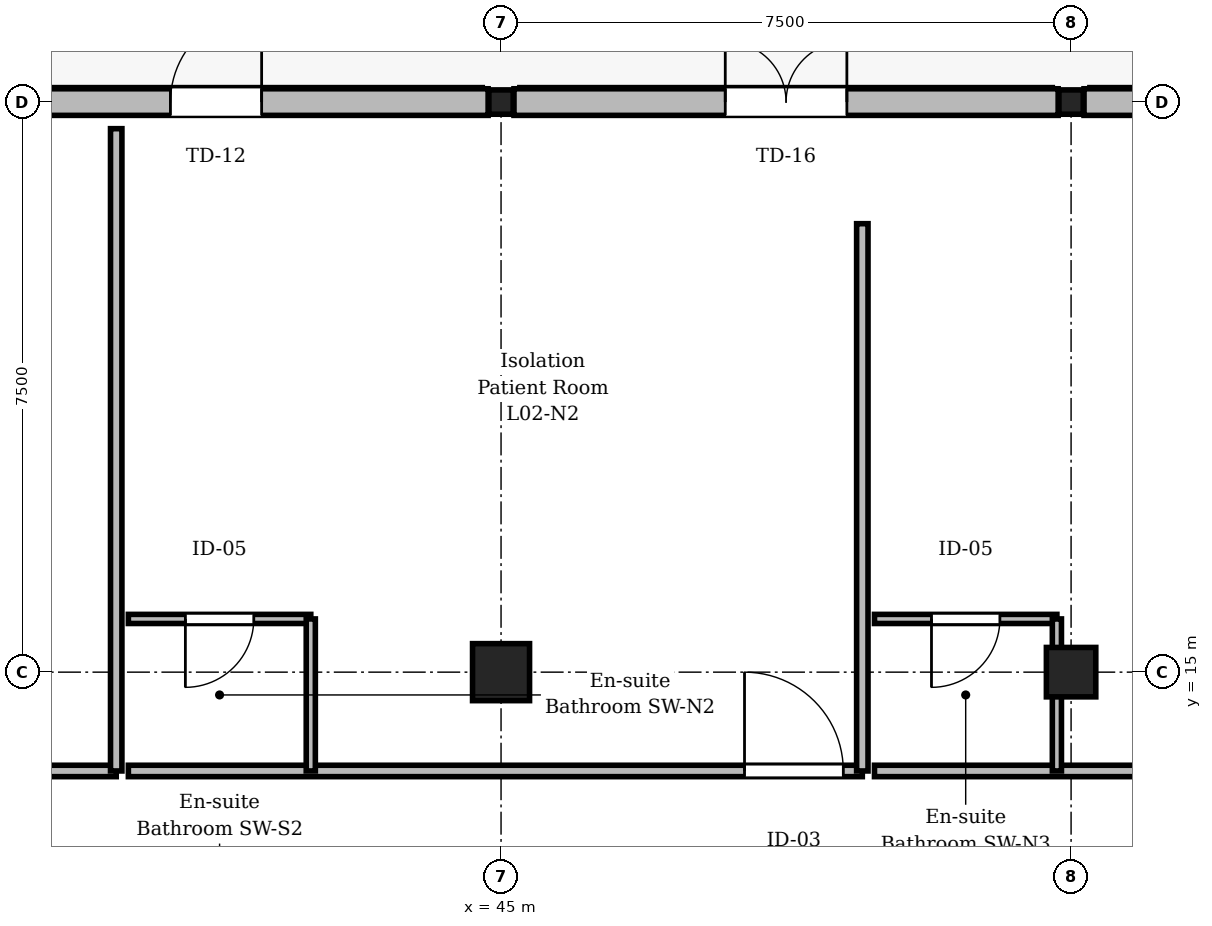
"""IFC4 building model, lengths in metres.
Left out: names, types, materials, properties, quantities, classifications, styles, units other than length and angle.
Written with IfcOpenShell. Run it as: python <this file> out.ifc"""

import sys

from ifc_helpers import new_model, si_unit, direction, frame, frame_2d, origin, origin_2d, place, context, subcontext, project, spatial, rectangle, extrude, element, fill, save


model = new_model("IFC4")
c1 = context("Model", 3, precision=1e-05, world=origin(), true_north=direction((0.0, 1.0)))
c2 = subcontext(c1, "Body", "Model", "MODEL_VIEW")
j1 = project(units=[si_unit("LENGTHUNIT", "METRE"), si_unit("PLANEANGLEUNIT", "RADIAN")], contexts=[c1])
p1 = place(None, origin())
s1 = spatial("IfcSite", under=j1, at=p1, CompositionType="ELEMENT")
p2 = place(p1, origin())
s2 = spatial("IfcBuilding", under=s1, at=p2, CompositionType="ELEMENT")
p3 = place(p2, frame((0.0, 0.0, 9.3)))
s3 = spatial("IfcBuildingStorey", under=s2, at=p3, CompositionType="ELEMENT", Elevation=9.3)
p4 = place(p3, frame((45.0, 15.0, 0.0), z_axis=(0.0, 0.0, 1.0), x_axis=(1.0, 0.0, 0.0)))
e1 = element("IfcColumn", 1, at=p4, inside=s3, PredefinedType="COLUMN", context=c2, shape_type="SweptSolid", body=[
    extrude(rectangle(XDim=0.75, YDim=0.75, at=origin_2d()), origin(), (0.0, 0.0, 1.0), 4.8),
])
p5 = place(p3, frame((45.0, 22.5, 0.0), z_axis=(0.0, 0.0, 1.0), x_axis=(1.0, 0.0, 0.0)))
e2 = element("IfcColumn", 2, at=p5, inside=s3, PredefinedType="COLUMN", context=c2, shape_type="SweptSolid", body=[
    extrude(rectangle(XDim=0.32, YDim=0.32, at=origin_2d()), origin(), (0.0, 0.0, 1.0), 4.8),
])
p6 = place(p3, frame((52.5, 15.0, 0.0), z_axis=(0.0, 0.0, 1.0), x_axis=(1.0, 0.0, 0.0)))
e3 = element("IfcColumn", 3, at=p6, inside=s3, PredefinedType="COLUMN", context=c2, shape_type="SweptSolid", body=[
    extrude(rectangle(XDim=0.65, YDim=0.65, at=origin_2d()), origin(), (0.0, 0.0, 1.0), 4.8),
])
p7 = place(p3, frame((52.5, 22.5, 0.0), z_axis=(0.0, 0.0, 1.0), x_axis=(1.0, 0.0, 0.0)))
e4 = element("IfcColumn", 4, at=p7, inside=s3, PredefinedType="COLUMN", context=c2, shape_type="SweptSolid", body=[
    extrude(rectangle(XDim=0.32, YDim=0.32, at=origin_2d()), origin(), (0.0, 0.0, 1.0), 4.8),
])
p8 = place(p3, frame((37.67, 22.5, 0.0), z_axis=(0.0, 0.0, 1.0), x_axis=(1.0, 0.0, 0.0)))
e5 = element("IfcWall", 5, at=p8, inside=s3, PredefinedType="STANDARD", context=c2, shape_type="SweptSolid", body=[
    extrude(rectangle(XDim=7.16, YDim=0.35, at=frame_2d((3.58, 0.0))), origin(), (0.0, 0.0, 1.0), 3.95),
])
p9 = place(p8, frame((2.98, 0.0, 0.0)))
e6 = element("IfcOpeningElement", 6, at=p9, cuts=e5, PredefinedType="OPENING", context=c2, shape_type="SweptSolid", body=[
    extrude(rectangle(XDim=1.2, YDim=2.3, at=frame_2d((0.6, 1.15))), frame((0.0, 0.185, 0.0), z_axis=(0.0, -1.0, 0.0), x_axis=(1.0, 0.0, 0.0)), (0.0, 0.0, 1.0), 0.37),
])
p10 = place(p3, frame((45.17, 22.5, 0.0), z_axis=(0.0, 0.0, 1.0), x_axis=(1.0, 0.0, 0.0)))
e7 = element("IfcWall", 7, at=p10, inside=s3, PredefinedType="STANDARD", context=c2, shape_type="SweptSolid", body=[
    extrude(rectangle(XDim=7.16, YDim=0.35, at=frame_2d((3.58, 0.0))), origin(), (0.0, 0.0, 1.0), 3.95),
])
p11 = place(p10, frame((2.78, 0.0, 0.0)))
e8 = element("IfcOpeningElement", 8, at=p11, cuts=e7, PredefinedType="OPENING", context=c2, shape_type="SweptSolid", body=[
    extrude(rectangle(XDim=1.6, YDim=2.35, at=frame_2d((0.8, 1.175))), frame((0.0, 0.185, 0.0), z_axis=(0.0, -1.0, 0.0), x_axis=(1.0, 0.0, 0.0)), (0.0, 0.0, 1.0), 0.37),
])
p12 = place(p3, frame((52.67, 22.5, 0.0), z_axis=(0.0, 0.0, 1.0), x_axis=(1.0, 0.0, 0.0)))
e9 = element("IfcWall", 9, at=p12, inside=s3, PredefinedType="STANDARD", context=c2, shape_type="SweptSolid", body=[
    extrude(rectangle(XDim=7.02, YDim=0.35, at=frame_2d((3.51, 0.0))), origin(), (0.0, 0.0, 1.0), 3.95),
])
p13 = place(p12, frame((2.91, 0.0, 0.0)))
e10 = element("IfcOpeningElement", 10, at=p13, cuts=e9, PredefinedType="OPENING", context=c2, shape_type="SweptSolid", body=[
    extrude(rectangle(XDim=1.2, YDim=2.3, at=frame_2d((0.6, 1.15))), frame((0.0, 0.185, 0.0), z_axis=(0.0, -1.0, 0.0), x_axis=(1.0, 0.0, 0.0)), (0.0, 0.0, 1.0), 0.37),
])
p14 = place(p3, frame((30.28, 13.7, 0.0), z_axis=(0.0, 0.0, 1.0), x_axis=(1.0, 0.0, 0.0)))
e11 = element("IfcWall", 11, at=p14, inside=s3, PredefinedType="PARTITIONING", context=c2, shape_type="SweptSolid", body=[
    extrude(rectangle(XDim=9.657, YDim=0.15, at=frame_2d((4.828, 0.0))), origin(), (0.0, 0.0, 1.0), 4.535),
])
p15 = place(p14, frame((3.393, 0.0, 0.0)))
e12 = element("IfcOpeningElement", 12, at=p15, cuts=e11, PredefinedType="OPENING", context=c2, shape_type="SweptSolid", body=[
    extrude(rectangle(XDim=1.3, YDim=2.2, at=frame_2d((0.65, 1.1))), frame((0.0, 0.085, 0.0), z_axis=(0.0, -1.0, 0.0), x_axis=(1.0, 0.0, 0.0)), (0.0, 0.0, 1.0), 0.17),
])
p16 = place(p3, frame((40.097, 13.7, 0.0), z_axis=(0.0, 0.0, 1.0), x_axis=(1.0, 0.0, 0.0)))
e13 = element("IfcWall", 13, at=p16, inside=s3, PredefinedType="PARTITIONING", context=c2, shape_type="SweptSolid", body=[
    extrude(rectangle(XDim=9.657, YDim=0.15, at=frame_2d((4.828, 0.0))), origin(), (0.0, 0.0, 1.0), 4.535),
])
p17 = place(p16, frame((8.107, 0.0, 0.0)))
e14 = element("IfcOpeningElement", 14, at=p17, cuts=e13, PredefinedType="OPENING", context=c2, shape_type="SweptSolid", body=[
    extrude(rectangle(XDim=1.3, YDim=2.2, at=frame_2d((0.65, 1.1))), frame((0.0, 0.085, 0.0), z_axis=(0.0, -1.0, 0.0), x_axis=(1.0, 0.0, 0.0)), (0.0, 0.0, 1.0), 0.17),
])
p18 = place(p3, frame((42.497, 15.7, 0.0), z_axis=(0.0, 0.0, 1.0), x_axis=(-1.0, 0.0, 0.0)))
e15 = element("IfcWall", 15, at=p18, inside=s3, PredefinedType="PARTITIONING", context=c2, shape_type="SweptSolid", body=[
    extrude(rectangle(XDim=2.4, YDim=0.12, at=frame_2d((1.2, 0.0))), origin(), (0.0, 0.0, 1.0), 4.535),
])
p19 = place(p18, frame((0.75, 0.0, 0.0)))
e16 = element("IfcOpeningElement", 16, at=p19, cuts=e15, PredefinedType="OPENING", context=c2, shape_type="SweptSolid", body=[
    extrude(rectangle(XDim=0.9, YDim=2.1, at=frame_2d((0.45, 1.05))), frame((0.0, 0.07, 0.0), z_axis=(0.0, -1.0, 0.0), x_axis=(1.0, 0.0, 0.0)), (0.0, 0.0, 1.0), 0.14),
])
p20 = place(p3, frame((42.497, 13.7, 0.0), z_axis=(0.0, 0.0, 1.0), x_axis=(0.0, 1.0, 0.0)))
e17 = element("IfcWall", 17, at=p20, inside=s3, PredefinedType="PARTITIONING", context=c2, shape_type="SweptSolid", body=[
    extrude(rectangle(XDim=2.0, YDim=0.12, at=frame_2d((1.0, 0.0))), origin(), (0.0, 0.0, 1.0), 4.535),
])
p21 = place(p3, frame((49.913, 13.7, 0.0), z_axis=(0.0, 0.0, 1.0), x_axis=(1.0, 0.0, 0.0)))
e18 = element("IfcWall", 18, at=p21, inside=s3, PredefinedType="PARTITIONING", context=c2, shape_type="SweptSolid", body=[
    extrude(rectangle(XDim=9.657, YDim=0.15, at=frame_2d((4.828, 0.0))), origin(), (0.0, 0.0, 1.0), 4.535),
])
p22 = place(p21, frame((5.75, 0.0, 0.0)))
e19 = element("IfcOpeningElement", 19, at=p22, cuts=e18, PredefinedType="OPENING", context=c2, shape_type="SweptSolid", body=[
    extrude(rectangle(XDim=1.3, YDim=2.2, at=frame_2d((0.65, 1.1))), frame((0.0, 0.085, 0.0), z_axis=(0.0, -1.0, 0.0), x_axis=(1.0, 0.0, 0.0)), (0.0, 0.0, 1.0), 0.17),
])
p23 = place(p3, frame((52.313, 15.7, 0.0), z_axis=(0.0, 0.0, 1.0), x_axis=(-1.0, 0.0, 0.0)))
e20 = element("IfcWall", 20, at=p23, inside=s3, PredefinedType="PARTITIONING", context=c2, shape_type="SweptSolid", body=[
    extrude(rectangle(XDim=2.4, YDim=0.12, at=frame_2d((1.2, 0.0))), origin(), (0.0, 0.0, 1.0), 4.535),
])
p24 = place(p23, frame((0.75, 0.0, 0.0)))
e21 = element("IfcOpeningElement", 21, at=p24, cuts=e20, PredefinedType="OPENING", context=c2, shape_type="SweptSolid", body=[
    extrude(rectangle(XDim=0.9, YDim=2.1, at=frame_2d((0.45, 1.05))), frame((0.0, 0.07, 0.0), z_axis=(0.0, -1.0, 0.0), x_axis=(1.0, 0.0, 0.0)), (0.0, 0.0, 1.0), 0.14),
])
p25 = place(p3, frame((52.313, 13.7, 0.0), z_axis=(0.0, 0.0, 1.0), x_axis=(0.0, 1.0, 0.0)))
e22 = element("IfcWall", 22, at=p25, inside=s3, PredefinedType="PARTITIONING", context=c2, shape_type="SweptSolid", body=[
    extrude(rectangle(XDim=2.0, YDim=0.12, at=frame_2d((1.0, 0.0))), origin(), (0.0, 0.0, 1.0), 3.985),
])
p26 = place(p3, frame((39.937, 13.7, 0.0), z_axis=(0.0, 0.0, 1.0), x_axis=(0.0, 1.0, 0.0)))
e23 = element("IfcWall", 23, at=p26, inside=s3, PredefinedType="PARTITIONING", context=c2, shape_type="SweptSolid", body=[
    extrude(rectangle(XDim=8.45, YDim=0.15, at=frame_2d((4.225, 0.0))), origin(), (0.0, 0.0, 1.0), 4.535),
])
p27 = place(p3, frame((49.753, 13.7, 0.0), z_axis=(0.0, 0.0, 1.0), x_axis=(0.0, 1.0, 0.0)))
e24 = element("IfcWall", 24, at=p27, inside=s3, PredefinedType="PARTITIONING", context=c2, shape_type="SweptSolid", body=[
    extrude(rectangle(XDim=7.2, YDim=0.15, at=frame_2d((3.6, 0.0))), origin(), (0.0, 0.0, 1.0), 4.535),
])
p28 = place(p9, origin())
e25 = element("IfcDoor", 25, at=p28, inside=s3, OperationType="SINGLE_SWING_RIGHT", PredefinedType="DOOR", context=c2, shape_type="SweptSolid", body=[
    extrude(rectangle(XDim=1.2, YDim=2.3, at=frame_2d((0.6, 1.15))), frame((0.0, 0.025, 0.0), z_axis=(0.0, -1.0, 0.0), x_axis=(1.0, 0.0, 0.0)), (0.0, 0.0, 1.0), 0.05),
])
fill(e6, e25)
p29 = place(p11, origin())
e26 = element("IfcDoor", 26, at=p29, inside=s3, OperationType="DOUBLE_DOOR_SINGLE_SWING", PredefinedType="DOOR", context=c2, shape_type="SweptSolid", body=[
    extrude(rectangle(XDim=1.6, YDim=2.35, at=frame_2d((0.8, 1.175))), frame((0.0, 0.025, 0.0), z_axis=(0.0, -1.0, 0.0), x_axis=(1.0, 0.0, 0.0)), (0.0, 0.0, 1.0), 0.05),
])
fill(e8, e26)
p30 = place(p17, origin())
e27 = element("IfcDoor", 27, at=p30, inside=s3, OperationType="SINGLE_SWING_LEFT", PredefinedType="DOOR", context=c2, shape_type="SweptSolid", body=[
    extrude(rectangle(XDim=1.3, YDim=2.2, at=frame_2d((0.65, 1.1))), frame((0.0, 0.025, 0.0), z_axis=(0.0, -1.0, 0.0), x_axis=(1.0, 0.0, 0.0)), (0.0, 0.0, 1.0), 0.05),
])
fill(e14, e27)
p31 = place(p19, origin())
e28 = element("IfcDoor", 28, at=p31, inside=s3, OperationType="SINGLE_SWING_RIGHT", PredefinedType="DOOR", context=c2, shape_type="SweptSolid", body=[
    extrude(rectangle(XDim=0.9, YDim=2.1, at=frame_2d((0.45, 1.05))), frame((0.0, 0.025, 0.0), z_axis=(0.0, -1.0, 0.0), x_axis=(1.0, 0.0, 0.0)), (0.0, 0.0, 1.0), 0.05),
])
fill(e16, e28)
p32 = place(p24, origin())
e29 = element("IfcDoor", 29, at=p32, inside=s3, OperationType="SINGLE_SWING_RIGHT", PredefinedType="DOOR", context=c2, shape_type="SweptSolid", body=[
    extrude(rectangle(XDim=0.9, YDim=2.1, at=frame_2d((0.45, 1.05))), frame((0.0, 0.025, 0.0), z_axis=(0.0, -1.0, 0.0), x_axis=(1.0, 0.0, 0.0)), (0.0, 0.0, 1.0), 0.05),
])
fill(e21, e29)
save(model, sys.argv[1])
